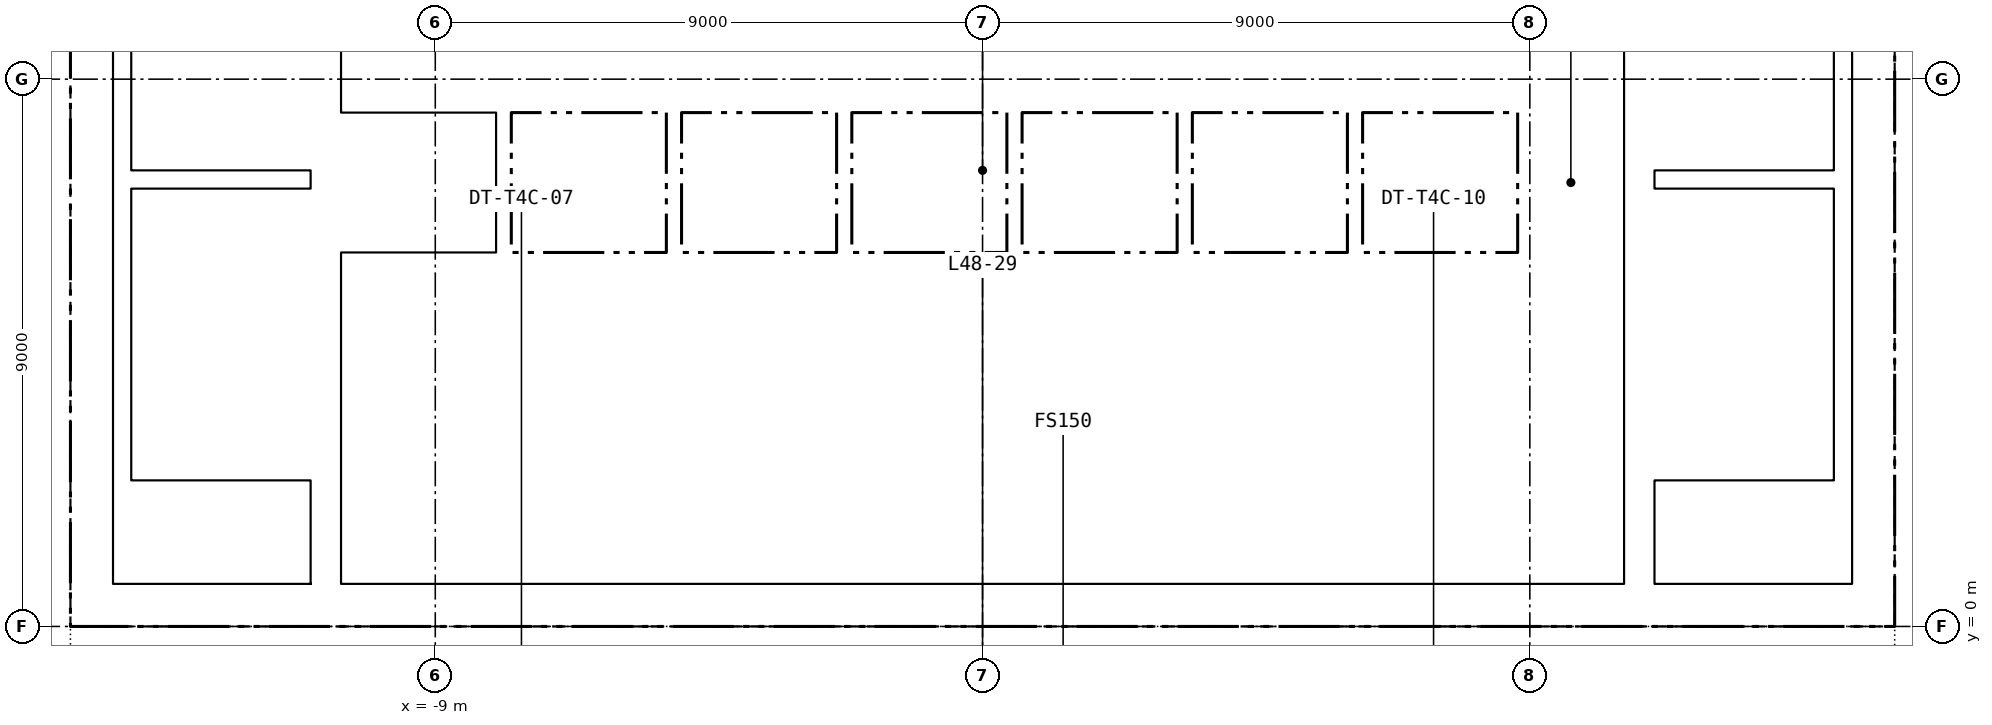
"""IFC4 building model, lengths in metres.
Left out: names, types, materials, properties, quantities, classifications, styles, units other than length and angle.
Written with IfcOpenShell. Run it as: python <this file> out.ifc"""

import sys

from ifc_helpers import new_model, si_unit, direction, frame, frame_2d, origin, place, context, subcontext, project, spatial, rectangle, extrude, element, fill, save


model = new_model("IFC4")
c1 = context("Model", 3, precision=1e-05, world=origin(), true_north=direction((0.0, 1.0)))
c2 = subcontext(c1, "Body", "Model", "MODEL_VIEW")
j1 = project(units=[si_unit("LENGTHUNIT", "METRE"), si_unit("PLANEANGLEUNIT", "RADIAN")], contexts=[c1])
p1 = place(None, origin())
s1 = spatial("IfcSite", under=j1, at=p1, CompositionType="ELEMENT")
p2 = place(p1, origin())
s2 = spatial("IfcBuilding", under=s1, at=p2, CompositionType="ELEMENT")
p3 = place(p2, frame((0.0, 0.0, 192.7)))
s3 = spatial("IfcBuildingStorey", under=s2, at=p3, CompositionType="ELEMENT", Elevation=192.7)
p4 = place(p3, frame((-15.0, 0.35, -0.15), z_axis=(0.0, 0.0, 1.0), x_axis=(1.0, 0.0, 0.0)))
e1 = element("IfcWall", 1, at=p4, inside=s3, PredefinedType="SOLIDWALL", context=c2, shape_type="SweptSolid", body=[
    extrude(rectangle(XDim=30.0, YDim=0.7, at=frame_2d((15.0, 0.0))), origin(), (0.0, 0.0, 1.0), 3.65),
])
p5 = place(p4, frame((5.8, 0.0, 0.15)))
e2 = element("IfcOpeningElement", 2, at=p5, cuts=e1, PredefinedType="OPENING", context=c2, shape_type="SweptSolid", body=[
    extrude(rectangle(XDim=2.4, YDim=2.4, at=frame_2d((1.2, 1.2))), frame((0.0, 0.36, 0.0), z_axis=(0.0, -1.0, 0.0), x_axis=(1.0, 0.0, 0.0)), (0.0, 0.0, 1.0), 0.72),
])
p6 = place(p4, frame((13.8, 0.0, 0.15)))
e3 = element("IfcOpeningElement", 3, at=p6, cuts=e1, PredefinedType="OPENING", context=c2, shape_type="SweptSolid", body=[
    extrude(rectangle(XDim=2.4, YDim=2.4, at=frame_2d((1.2, 1.2))), frame((0.0, 0.36, 0.0), z_axis=(0.0, -1.0, 0.0), x_axis=(1.0, 0.0, 0.0)), (0.0, 0.0, 1.0), 0.72),
])
p7 = place(p4, frame((21.8, 0.0, 0.15)))
e4 = element("IfcOpeningElement", 4, at=p7, cuts=e1, PredefinedType="OPENING", context=c2, shape_type="SweptSolid", body=[
    extrude(rectangle(XDim=2.4, YDim=2.4, at=frame_2d((1.2, 1.2))), frame((0.0, 0.36, 0.0), z_axis=(0.0, -1.0, 0.0), x_axis=(1.0, 0.0, 0.0)), (0.0, 0.0, 1.0), 0.72),
])
p8 = place(p4, frame((1.5, 0.0, 0.15)))
e5 = element("IfcOpeningElement", 5, at=p8, cuts=e1, PredefinedType="OPENING", context=c2, shape_type="SweptSolid", body=[
    extrude(rectangle(XDim=1.2, YDim=2.1, at=frame_2d((0.6, 1.05))), frame((0.0, 0.36, 0.0), z_axis=(0.0, -1.0, 0.0), x_axis=(1.0, 0.0, 0.0)), (0.0, 0.0, 1.0), 0.72),
])
p9 = place(p4, frame((27.3, 0.0, 0.15)))
e6 = element("IfcOpeningElement", 6, at=p9, cuts=e1, PredefinedType="OPENING", context=c2, shape_type="SweptSolid", body=[
    extrude(rectangle(XDim=1.2, YDim=2.1, at=frame_2d((0.6, 1.05))), frame((0.0, 0.36, 0.0), z_axis=(0.0, -1.0, 0.0), x_axis=(1.0, 0.0, 0.0)), (0.0, 0.0, 1.0), 0.72),
])
for number, where, z_axis, x_axis in (
    (7, (-14.65, 0.7, -0.15), (0.0, 0.0, 1.0), (0.0, 1.0, 0.0)),
    (8, (14.65, 0.7, -0.15), (0.0, 0.0, 1.0), (0.0, 1.0, 0.0)),
):
    element("IfcWall", number, at=place(p3, frame(where, z_axis=z_axis, x_axis=x_axis)), inside=s3, PredefinedType="SOLIDWALL", context=c2, shape_type="SweptSolid", body=[
        extrude(rectangle(XDim=13.6, YDim=0.7, at=frame_2d((6.8, 0.0))), origin(), (0.0, 0.0, 1.0), 3.65),
    ])
for number, where, z_axis, x_axis in (
    (9, (-10.8, 0.7, -0.15), (0.0, 0.0, 1.0), (0.0, 1.0, 0.0)),
    (10, (10.8, 0.7, -0.15), (0.0, 0.0, 1.0), (0.0, 1.0, 0.0)),
):
    element("IfcWall", number, at=place(p3, frame(where, z_axis=z_axis, x_axis=x_axis)), inside=s3, PredefinedType="SOLIDWALL", context=c2, shape_type="SweptSolid", body=[
        extrude(rectangle(XDim=13.6, YDim=0.5, at=frame_2d((6.8, 0.0))), origin(), (0.0, 0.0, 1.0), 3.65),
    ])
p10 = place(p3, frame((-10.55, 3.5, 0.0), z_axis=(0.0, 0.0, 1.0), x_axis=(1.0, 0.0, 0.0)))
e11 = element("IfcWall", 11, at=p10, inside=s3, PredefinedType="PARTITIONING", context=c2, shape_type="SweptSolid", body=[
    extrude(rectangle(XDim=21.1, YDim=0.2, at=frame_2d((10.55, 0.0))), origin(), (0.0, 0.0, 1.0), 3.5),
])
p11 = place(p10, frame((2.312, 0.0, 0.0)))
e12 = element("IfcOpeningElement", 12, at=p11, cuts=e11, PredefinedType="OPENING", context=c2, shape_type="SweptSolid", body=[
    extrude(rectangle(XDim=1.0, YDim=2.1, at=frame_2d((0.5, 1.05))), frame((0.0, 0.11, 0.0), z_axis=(0.0, -1.0, 0.0), x_axis=(1.0, 0.0, 0.0)), (0.0, 0.0, 1.0), 0.22),
])
p12 = place(p10, frame((7.05, 0.0, 0.0)))
e13 = element("IfcOpeningElement", 13, at=p12, cuts=e11, PredefinedType="OPENING", context=c2, shape_type="SweptSolid", body=[
    extrude(rectangle(XDim=1.0, YDim=2.1, at=frame_2d((0.5, 1.05))), frame((0.0, 0.11, 0.0), z_axis=(0.0, -1.0, 0.0), x_axis=(1.0, 0.0, 0.0)), (0.0, 0.0, 1.0), 0.22),
])
p13 = place(p10, frame((10.175, 0.0, 0.0)))
e14 = element("IfcOpeningElement", 14, at=p13, cuts=e11, PredefinedType="OPENING", context=c2, shape_type="SweptSolid", body=[
    extrude(rectangle(XDim=1.0, YDim=2.1, at=frame_2d((0.5, 1.05))), frame((0.0, 0.11, 0.0), z_axis=(0.0, -1.0, 0.0), x_axis=(1.0, 0.0, 0.0)), (0.0, 0.0, 1.0), 0.22),
])
p14 = place(p10, frame((14.05, 0.0, 0.0)))
e15 = element("IfcOpeningElement", 15, at=p14, cuts=e11, PredefinedType="OPENING", context=c2, shape_type="SweptSolid", body=[
    extrude(rectangle(XDim=1.0, YDim=2.1, at=frame_2d((0.5, 1.05))), frame((0.0, 0.11, 0.0), z_axis=(0.0, -1.0, 0.0), x_axis=(1.0, 0.0, 0.0)), (0.0, 0.0, 1.0), 0.22),
])
p15 = place(p10, frame((17.837, 0.0, 0.0)))
e16 = element("IfcOpeningElement", 16, at=p15, cuts=e11, PredefinedType="OPENING", context=c2, shape_type="SweptSolid", body=[
    extrude(rectangle(XDim=0.9, YDim=2.1, at=frame_2d((0.45, 1.05))), frame((0.0, 0.11, 0.0), z_axis=(0.0, -1.0, 0.0), x_axis=(1.0, 0.0, 0.0)), (0.0, 0.0, 1.0), 0.22),
])
p16 = place(p10, frame((19.9, 0.0, 0.0)))
e17 = element("IfcOpeningElement", 17, at=p16, cuts=e11, PredefinedType="OPENING", context=c2, shape_type="SweptSolid", body=[
    extrude(rectangle(XDim=0.9, YDim=2.1, at=frame_2d((0.45, 1.05))), frame((0.0, 0.11, 0.0), z_axis=(0.0, -1.0, 0.0), x_axis=(1.0, 0.0, 0.0)), (0.0, 0.0, 1.0), 0.22),
])
p17 = place(p3, frame((-10.55, 6.025, 0.0), z_axis=(0.0, 0.0, 1.0), x_axis=(1.0, 0.0, 0.0)))
e18 = element("IfcWall", 18, at=p17, inside=s3, PredefinedType="PARTITIONING", context=c2, shape_type="SweptSolid", body=[
    extrude(rectangle(XDim=21.1, YDim=0.25, at=frame_2d((10.55, 0.0))), origin(), (0.0, 0.0, 1.0), 3.5),
])
p18 = place(p3, frame((-10.55, 8.55, 0.0), z_axis=(0.0, 0.0, 1.0), x_axis=(1.0, 0.0, 0.0)))
e19 = element("IfcWall", 19, at=p18, inside=s3, PredefinedType="PARTITIONING", context=c2, shape_type="SweptSolid", body=[
    extrude(rectangle(XDim=21.1, YDim=0.2, at=frame_2d((10.55, 0.0))), origin(), (0.0, 0.0, 1.0), 3.5),
])
p19 = place(p18, frame((0.675, 0.0, 0.0)))
e20 = element("IfcOpeningElement", 20, at=p19, cuts=e19, PredefinedType="OPENING", context=c2, shape_type="SweptSolid", body=[
    extrude(rectangle(XDim=1.2, YDim=2.1, at=frame_2d((0.6, 1.05))), frame((0.0, 0.11, 0.0), z_axis=(0.0, -1.0, 0.0), x_axis=(1.0, 0.0, 0.0)), (0.0, 0.0, 1.0), 0.22),
])
p20 = place(p18, frame((3.475, 0.0, 0.0)))
e21 = element("IfcOpeningElement", 21, at=p20, cuts=e19, PredefinedType="OPENING", context=c2, shape_type="SweptSolid", body=[
    extrude(rectangle(XDim=1.2, YDim=2.1, at=frame_2d((0.6, 1.05))), frame((0.0, 0.11, 0.0), z_axis=(0.0, -1.0, 0.0), x_axis=(1.0, 0.0, 0.0)), (0.0, 0.0, 1.0), 0.22),
])
p21 = place(p18, frame((6.275, 0.0, 0.0)))
e22 = element("IfcOpeningElement", 22, at=p21, cuts=e19, PredefinedType="OPENING", context=c2, shape_type="SweptSolid", body=[
    extrude(rectangle(XDim=1.2, YDim=2.1, at=frame_2d((0.6, 1.05))), frame((0.0, 0.11, 0.0), z_axis=(0.0, -1.0, 0.0), x_axis=(1.0, 0.0, 0.0)), (0.0, 0.0, 1.0), 0.22),
])
p22 = place(p18, frame((9.075, 0.0, 0.0)))
e23 = element("IfcOpeningElement", 23, at=p22, cuts=e19, PredefinedType="OPENING", context=c2, shape_type="SweptSolid", body=[
    extrude(rectangle(XDim=1.2, YDim=2.1, at=frame_2d((0.6, 1.05))), frame((0.0, 0.11, 0.0), z_axis=(0.0, -1.0, 0.0), x_axis=(1.0, 0.0, 0.0)), (0.0, 0.0, 1.0), 0.22),
])
p23 = place(p18, frame((11.875, 0.0, 0.0)))
e24 = element("IfcOpeningElement", 24, at=p23, cuts=e19, PredefinedType="OPENING", context=c2, shape_type="SweptSolid", body=[
    extrude(rectangle(XDim=1.2, YDim=2.1, at=frame_2d((0.6, 1.05))), frame((0.0, 0.11, 0.0), z_axis=(0.0, -1.0, 0.0), x_axis=(1.0, 0.0, 0.0)), (0.0, 0.0, 1.0), 0.22),
])
p24 = place(p18, frame((14.675, 0.0, 0.0)))
e25 = element("IfcOpeningElement", 25, at=p24, cuts=e19, PredefinedType="OPENING", context=c2, shape_type="SweptSolid", body=[
    extrude(rectangle(XDim=1.2, YDim=2.1, at=frame_2d((0.6, 1.05))), frame((0.0, 0.11, 0.0), z_axis=(0.0, -1.0, 0.0), x_axis=(1.0, 0.0, 0.0)), (0.0, 0.0, 1.0), 0.22),
])
p25 = place(p18, frame((17.475, 0.0, 0.0)))
e26 = element("IfcOpeningElement", 26, at=p25, cuts=e19, PredefinedType="OPENING", context=c2, shape_type="SweptSolid", body=[
    extrude(rectangle(XDim=1.2, YDim=2.1, at=frame_2d((0.6, 1.05))), frame((0.0, 0.11, 0.0), z_axis=(0.0, -1.0, 0.0), x_axis=(1.0, 0.0, 0.0)), (0.0, 0.0, 1.0), 0.22),
])
p26 = place(p18, frame((19.9, 0.0, 0.0)))
e27 = element("IfcOpeningElement", 27, at=p26, cuts=e19, PredefinedType="OPENING", context=c2, shape_type="SweptSolid", body=[
    extrude(rectangle(XDim=0.9, YDim=2.1, at=frame_2d((0.45, 1.05))), frame((0.0, 0.11, 0.0), z_axis=(0.0, -1.0, 0.0), x_axis=(1.0, 0.0, 0.0)), (0.0, 0.0, 1.0), 0.22),
])
p27 = place(p3, frame((-4.125, 8.65, 0.0), z_axis=(0.0, 0.0, 1.0), x_axis=(0.0, 1.0, 0.0)))
e28 = element("IfcWall", 28, at=p27, inside=s3, PredefinedType="PARTITIONING", context=c2, shape_type="SweptSolid", body=[
    extrude(rectangle(XDim=2.45, YDim=0.25, at=frame_2d((1.225, 0.0))), origin(), (0.0, 0.0, 1.0), 3.5),
])
p28 = place(p27, frame((0.625, 0.0, 0.0)))
e29 = element("IfcOpeningElement", 29, at=p28, cuts=e28, PredefinedType="OPENING", context=c2, shape_type="SweptSolid", body=[
    extrude(rectangle(XDim=1.2, YDim=2.1, at=frame_2d((0.6, 1.05))), frame((0.0, 0.135, 0.0), z_axis=(0.0, -1.0, 0.0), x_axis=(1.0, 0.0, 0.0)), (0.0, 0.0, 1.0), 0.27),
])
for number, where, z_axis, x_axis in (
    (30, (-4.85, 3.6, 0.0), (0.0, 0.0, 1.0), (0.0, 1.0, 0.0)),
    (31, (-1.15, 3.6, 0.0), (0.0, 0.0, 1.0), (0.0, 1.0, 0.0)),
    (32, (1.4, 3.6, 0.0), (0.0, 0.0, 1.0), (0.0, 1.0, 0.0)),
    (33, (6.6, 3.6, 0.0), (0.0, 0.0, 1.0), (0.0, 1.0, 0.0)),
):
    element("IfcWall", number, at=place(p3, frame(where, z_axis=z_axis, x_axis=x_axis)), inside=s3, PredefinedType="PARTITIONING", context=c2, shape_type="SweptSolid", body=[
        extrude(rectangle(XDim=2.3, YDim=0.15, at=frame_2d((1.15, 0.0))), origin(), (0.0, 0.0, 1.0), 3.5),
    ])
p29 = place(p3, frame((8.925, 3.6, 0.0), z_axis=(0.0, 0.0, 1.0), x_axis=(0.0, 1.0, 0.0)))
e34 = element("IfcWall", 34, at=p29, inside=s3, PredefinedType="PARTITIONING", context=c2, shape_type="SweptSolid", body=[
    extrude(rectangle(XDim=2.3, YDim=0.25, at=frame_2d((1.15, 0.0))), origin(), (0.0, 0.0, 1.0), 3.5),
])
for number, where, z_axis, x_axis in (
    (35, (-7.875, 6.15, 0.0), (0.0, 0.0, 1.0), (0.0, 1.0, 0.0)),
    (36, (-5.075, 6.15, 0.0), (0.0, 0.0, 1.0), (0.0, 1.0, 0.0)),
    (37, (-2.275, 6.15, 0.0), (0.0, 0.0, 1.0), (0.0, 1.0, 0.0)),
    (38, (0.525, 6.15, 0.0), (0.0, 0.0, 1.0), (0.0, 1.0, 0.0)),
    (39, (3.325, 6.15, 0.0), (0.0, 0.0, 1.0), (0.0, 1.0, 0.0)),
    (40, (6.125, 6.15, 0.0), (0.0, 0.0, 1.0), (0.0, 1.0, 0.0)),
    (41, (8.925, 6.15, 0.0), (0.0, 0.0, 1.0), (0.0, 1.0, 0.0)),
):
    element("IfcWall", number, at=place(p3, frame(where, z_axis=z_axis, x_axis=x_axis)), inside=s3, PredefinedType="PARTITIONING", context=c2, shape_type="SweptSolid", body=[
        extrude(rectangle(XDim=2.3, YDim=0.25, at=frame_2d((1.15, 0.0))), origin(), (0.0, 0.0, 1.0), 3.5),
    ])
p30 = place(p3, frame((-14.0, 7.35, 0.0), z_axis=(0.0, 0.0, 1.0), x_axis=(1.0, 0.0, 0.0)))
e42 = element("IfcWall", 42, at=p30, inside=s3, PredefinedType="SOLIDWALL", context=c2, shape_type="SweptSolid", body=[
    extrude(rectangle(XDim=2.95, YDim=0.3, at=frame_2d((1.475, 0.0))), origin(), (0.0, 0.0, 1.0), 3.5),
])
p31 = place(p3, frame((-14.15, 0.7, 0.0), z_axis=(0.0, 0.0, 1.0), x_axis=(0.0, 1.0, 0.0)))
e43 = element("IfcWall", 43, at=p31, inside=s3, PredefinedType="SOLIDWALL", context=c2, shape_type="SweptSolid", body=[
    extrude(rectangle(XDim=13.6, YDim=0.3, at=frame_2d((6.8, 0.0))), origin(), (0.0, 0.0, 1.0), 3.5),
])
p32 = place(p3, frame((11.05, 7.35, 0.0), z_axis=(0.0, 0.0, 1.0), x_axis=(1.0, 0.0, 0.0)))
e44 = element("IfcWall", 44, at=p32, inside=s3, PredefinedType="SOLIDWALL", context=c2, shape_type="SweptSolid", body=[
    extrude(rectangle(XDim=2.95, YDim=0.3, at=frame_2d((1.475, 0.0))), origin(), (0.0, 0.0, 1.0), 3.5),
])
p33 = place(p3, frame((14.15, 0.7, 0.0), z_axis=(0.0, 0.0, 1.0), x_axis=(0.0, 1.0, 0.0)))
e45 = element("IfcWall", 45, at=p33, inside=s3, PredefinedType="SOLIDWALL", context=c2, shape_type="SweptSolid", body=[
    extrude(rectangle(XDim=13.6, YDim=0.3, at=frame_2d((6.8, 0.0))), origin(), (0.0, 0.0, 1.0), 3.5),
])
p34 = place(p28, origin())
e46 = element("IfcDoor", 46, at=p34, inside=s3, OperationType="SINGLE_SWING_LEFT", PredefinedType="DOOR", context=c2, shape_type="SweptSolid", body=[
    extrude(rectangle(XDim=1.2, YDim=2.1, at=frame_2d((0.6, 1.05))), frame((0.0, 0.025, 0.0), z_axis=(0.0, -1.0, 0.0), x_axis=(1.0, 0.0, 0.0)), (0.0, 0.0, 1.0), 0.05),
])
fill(e29, e46)
p35 = place(p11, origin())
e47 = element("IfcDoor", 47, at=p35, inside=s3, OperationType="SINGLE_SWING_LEFT", PredefinedType="DOOR", context=c2, shape_type="SweptSolid", body=[
    extrude(rectangle(XDim=1.0, YDim=2.1, at=frame_2d((0.5, 1.05))), frame((0.0, 0.025, 0.0), z_axis=(0.0, -1.0, 0.0), x_axis=(1.0, 0.0, 0.0)), (0.0, 0.0, 1.0), 0.05),
])
fill(e12, e47)
p36 = place(p12, origin())
e48 = element("IfcDoor", 48, at=p36, inside=s3, OperationType="SINGLE_SWING_RIGHT", PredefinedType="DOOR", context=c2, shape_type="SweptSolid", body=[
    extrude(rectangle(XDim=1.0, YDim=2.1, at=frame_2d((0.5, 1.05))), frame((0.0, 0.025, 0.0), z_axis=(0.0, -1.0, 0.0), x_axis=(1.0, 0.0, 0.0)), (0.0, 0.0, 1.0), 0.05),
])
fill(e13, e48)
p37 = place(p13, origin())
e49 = element("IfcDoor", 49, at=p37, inside=s3, OperationType="SINGLE_SWING_LEFT", PredefinedType="DOOR", context=c2, shape_type="SweptSolid", body=[
    extrude(rectangle(XDim=1.0, YDim=2.1, at=frame_2d((0.5, 1.05))), frame((0.0, 0.025, 0.0), z_axis=(0.0, -1.0, 0.0), x_axis=(1.0, 0.0, 0.0)), (0.0, 0.0, 1.0), 0.05),
])
fill(e14, e49)
p38 = place(p14, origin())
e50 = element("IfcDoor", 50, at=p38, inside=s3, OperationType="SINGLE_SWING_RIGHT", PredefinedType="DOOR", context=c2, shape_type="SweptSolid", body=[
    extrude(rectangle(XDim=1.0, YDim=2.1, at=frame_2d((0.5, 1.05))), frame((0.0, 0.025, 0.0), z_axis=(0.0, -1.0, 0.0), x_axis=(1.0, 0.0, 0.0)), (0.0, 0.0, 1.0), 0.05),
])
fill(e15, e50)
p39 = place(p15, origin())
e51 = element("IfcDoor", 51, at=p39, inside=s3, OperationType="SINGLE_SWING_LEFT", PredefinedType="DOOR", context=c2, shape_type="SweptSolid", body=[
    extrude(rectangle(XDim=0.9, YDim=2.1, at=frame_2d((0.45, 1.05))), frame((0.0, 0.025, 0.0), z_axis=(0.0, -1.0, 0.0), x_axis=(1.0, 0.0, 0.0)), (0.0, 0.0, 1.0), 0.05),
])
fill(e16, e51)
p40 = place(p16, origin())
e52 = element("IfcDoor", 52, at=p40, inside=s3, OperationType="SINGLE_SWING_RIGHT", PredefinedType="DOOR", context=c2, shape_type="SweptSolid", body=[
    extrude(rectangle(XDim=0.9, YDim=2.1, at=frame_2d((0.45, 1.05))), frame((0.0, 0.025, 0.0), z_axis=(0.0, -1.0, 0.0), x_axis=(1.0, 0.0, 0.0)), (0.0, 0.0, 1.0), 0.05),
])
fill(e17, e52)
p41 = place(p19, origin())
e53 = element("IfcDoor", 53, at=p41, inside=s3, OperationType="DOUBLE_DOOR_SLIDING", PredefinedType="DOOR", context=c2, shape_type="SweptSolid", body=[
    extrude(rectangle(XDim=1.2, YDim=2.1, at=frame_2d((0.6, 1.05))), frame((0.0, 0.025, 0.0), z_axis=(0.0, -1.0, 0.0), x_axis=(1.0, 0.0, 0.0)), (0.0, 0.0, 1.0), 0.05),
])
fill(e20, e53)
p42 = place(p20, origin())
e54 = element("IfcDoor", 54, at=p42, inside=s3, OperationType="DOUBLE_DOOR_SLIDING", PredefinedType="DOOR", context=c2, shape_type="SweptSolid", body=[
    extrude(rectangle(XDim=1.2, YDim=2.1, at=frame_2d((0.6, 1.05))), frame((0.0, 0.025, 0.0), z_axis=(0.0, -1.0, 0.0), x_axis=(1.0, 0.0, 0.0)), (0.0, 0.0, 1.0), 0.05),
])
fill(e21, e54)
p43 = place(p21, origin())
e55 = element("IfcDoor", 55, at=p43, inside=s3, OperationType="DOUBLE_DOOR_SLIDING", PredefinedType="DOOR", context=c2, shape_type="SweptSolid", body=[
    extrude(rectangle(XDim=1.2, YDim=2.1, at=frame_2d((0.6, 1.05))), frame((0.0, 0.025, 0.0), z_axis=(0.0, -1.0, 0.0), x_axis=(1.0, 0.0, 0.0)), (0.0, 0.0, 1.0), 0.05),
])
fill(e22, e55)
p44 = place(p22, origin())
e56 = element("IfcDoor", 56, at=p44, inside=s3, OperationType="DOUBLE_DOOR_SLIDING", PredefinedType="DOOR", context=c2, shape_type="SweptSolid", body=[
    extrude(rectangle(XDim=1.2, YDim=2.1, at=frame_2d((0.6, 1.05))), frame((0.0, 0.025, 0.0), z_axis=(0.0, -1.0, 0.0), x_axis=(1.0, 0.0, 0.0)), (0.0, 0.0, 1.0), 0.05),
])
fill(e23, e56)
p45 = place(p23, origin())
e57 = element("IfcDoor", 57, at=p45, inside=s3, OperationType="DOUBLE_DOOR_SLIDING", PredefinedType="DOOR", context=c2, shape_type="SweptSolid", body=[
    extrude(rectangle(XDim=1.2, YDim=2.1, at=frame_2d((0.6, 1.05))), frame((0.0, 0.025, 0.0), z_axis=(0.0, -1.0, 0.0), x_axis=(1.0, 0.0, 0.0)), (0.0, 0.0, 1.0), 0.05),
])
fill(e24, e57)
p46 = place(p24, origin())
e58 = element("IfcDoor", 58, at=p46, inside=s3, OperationType="DOUBLE_DOOR_SLIDING", PredefinedType="DOOR", context=c2, shape_type="SweptSolid", body=[
    extrude(rectangle(XDim=1.2, YDim=2.1, at=frame_2d((0.6, 1.05))), frame((0.0, 0.025, 0.0), z_axis=(0.0, -1.0, 0.0), x_axis=(1.0, 0.0, 0.0)), (0.0, 0.0, 1.0), 0.05),
])
fill(e25, e58)
p47 = place(p25, origin())
e59 = element("IfcDoor", 59, at=p47, inside=s3, OperationType="DOUBLE_DOOR_SLIDING", PredefinedType="DOOR", context=c2, shape_type="SweptSolid", body=[
    extrude(rectangle(XDim=1.2, YDim=2.1, at=frame_2d((0.6, 1.05))), frame((0.0, 0.025, 0.0), z_axis=(0.0, -1.0, 0.0), x_axis=(1.0, 0.0, 0.0)), (0.0, 0.0, 1.0), 0.05),
])
fill(e26, e59)
p48 = place(p26, origin())
e60 = element("IfcDoor", 60, at=p48, inside=s3, OperationType="SINGLE_SWING_RIGHT", PredefinedType="DOOR", context=c2, shape_type="SweptSolid", body=[
    extrude(rectangle(XDim=0.9, YDim=2.1, at=frame_2d((0.45, 1.05))), frame((0.0, 0.025, 0.0), z_axis=(0.0, -1.0, 0.0), x_axis=(1.0, 0.0, 0.0)), (0.0, 0.0, 1.0), 0.05),
])
fill(e27, e60)
p49 = place(p5, origin())
e61 = element("IfcDoor", 61, at=p49, inside=s3, OperationType="DOUBLE_DOOR_DOUBLE_SWING", PredefinedType="DOOR", context=c2, shape_type="SweptSolid", body=[
    extrude(rectangle(XDim=2.4, YDim=2.4, at=frame_2d((1.2, 1.2))), frame((0.0, 0.025, 0.0), z_axis=(0.0, -1.0, 0.0), x_axis=(1.0, 0.0, 0.0)), (0.0, 0.0, 1.0), 0.05),
])
fill(e2, e61)
p50 = place(p6, origin())
e62 = element("IfcDoor", 62, at=p50, inside=s3, OperationType="DOUBLE_DOOR_DOUBLE_SWING", PredefinedType="DOOR", context=c2, shape_type="SweptSolid", body=[
    extrude(rectangle(XDim=2.4, YDim=2.4, at=frame_2d((1.2, 1.2))), frame((0.0, 0.025, 0.0), z_axis=(0.0, -1.0, 0.0), x_axis=(1.0, 0.0, 0.0)), (0.0, 0.0, 1.0), 0.05),
])
fill(e3, e62)
p51 = place(p7, origin())
e63 = element("IfcDoor", 63, at=p51, inside=s3, OperationType="DOUBLE_DOOR_DOUBLE_SWING", PredefinedType="DOOR", context=c2, shape_type="SweptSolid", body=[
    extrude(rectangle(XDim=2.4, YDim=2.4, at=frame_2d((1.2, 1.2))), frame((0.0, 0.025, 0.0), z_axis=(0.0, -1.0, 0.0), x_axis=(1.0, 0.0, 0.0)), (0.0, 0.0, 1.0), 0.05),
])
fill(e4, e63)
p52 = place(p8, origin())
e64 = element("IfcDoor", 64, at=p52, inside=s3, OperationType="SINGLE_SWING_LEFT", PredefinedType="DOOR", context=c2, shape_type="SweptSolid", body=[
    extrude(rectangle(XDim=1.2, YDim=2.1, at=frame_2d((0.6, 1.05))), frame((0.0, 0.025, 0.0), z_axis=(0.0, -1.0, 0.0), x_axis=(1.0, 0.0, 0.0)), (0.0, 0.0, 1.0), 0.05),
])
fill(e5, e64)
p53 = place(p9, origin())
e65 = element("IfcDoor", 65, at=p53, inside=s3, OperationType="SINGLE_SWING_RIGHT", PredefinedType="DOOR", context=c2, shape_type="SweptSolid", body=[
    extrude(rectangle(XDim=1.2, YDim=2.1, at=frame_2d((0.6, 1.05))), frame((0.0, 0.025, 0.0), z_axis=(0.0, -1.0, 0.0), x_axis=(1.0, 0.0, 0.0)), (0.0, 0.0, 1.0), 0.05),
])
fill(e6, e65)
save(model, sys.argv[1])
